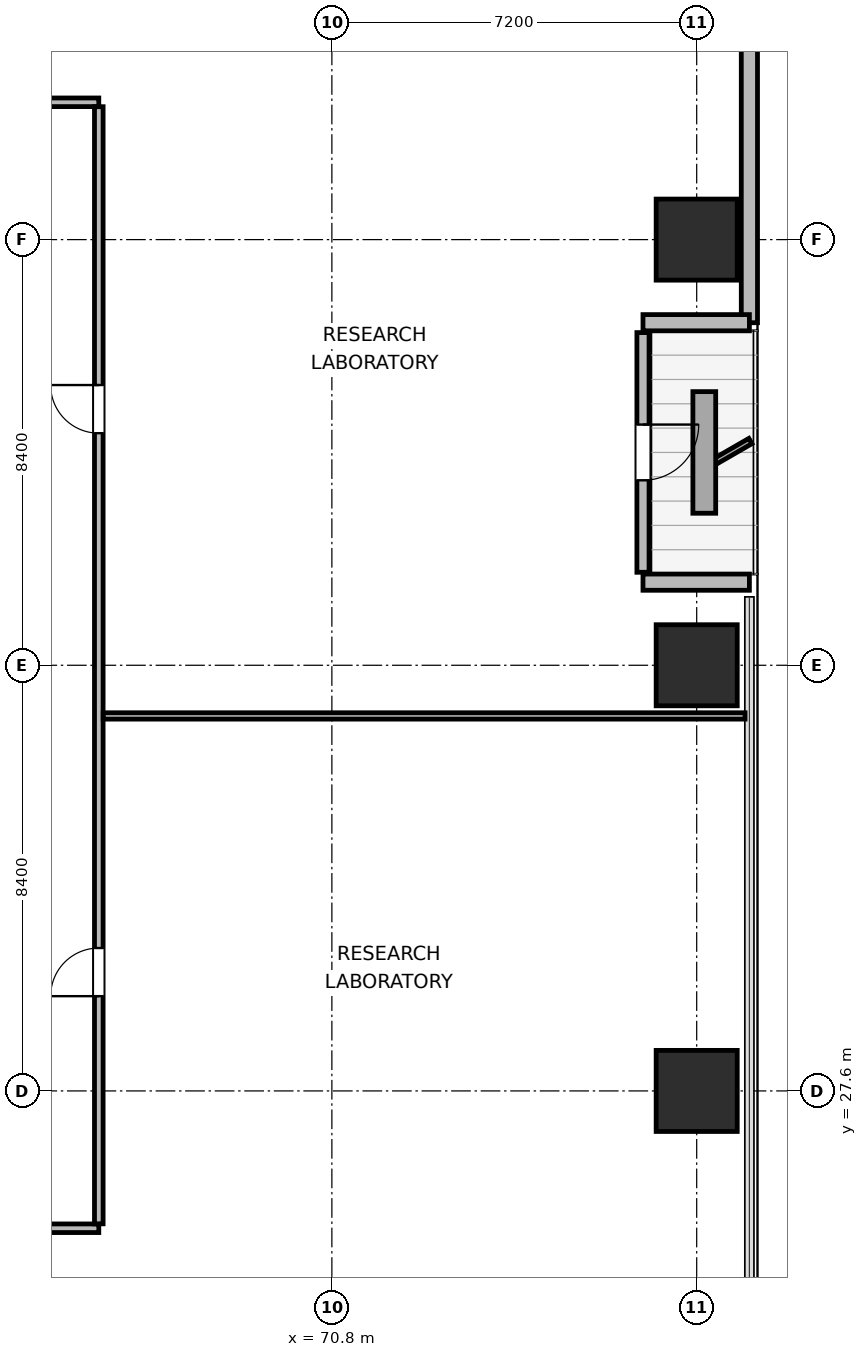
"""IFC4 building model, lengths in metres.
Left out: names, types, materials, properties, quantities, classifications, styles, units other than length and angle.
Written with IfcOpenShell. Run it as: python <this file> out.ifc"""

import sys

from ifc_helpers import new_model, si_unit, direction, frame, frame_2d, origin, origin_2d, place, context, subcontext, project, spatial, rectangle, extrude, element, fill, save


model = new_model("IFC4")
c1 = context("Model", 3, precision=1e-05, world=origin(), true_north=direction((0.0, 1.0)))
c2 = subcontext(c1, "Body", "Model", "MODEL_VIEW")
j1 = project(units=[si_unit("LENGTHUNIT", "METRE"), si_unit("PLANEANGLEUNIT", "RADIAN")], contexts=[c1])
p1 = place(None, origin())
s1 = spatial("IfcSite", under=j1, at=p1, CompositionType="ELEMENT")
p2 = place(p1, origin())
s2 = spatial("IfcBuilding", under=s1, at=p2, CompositionType="ELEMENT")
p3 = place(p2, frame((0.0, 0.0, 45.0)))
s3 = spatial("IfcBuildingStorey", under=s2, at=p3, CompositionType="ELEMENT", Elevation=45.0)
for number, where, z_axis, x_axis in (
    (1, (78.0, 27.6, 0.0), (0.0, 0.0, 1.0), (1.0, 0.0, 0.0)),
    (2, (78.0, 36.0, 0.0), (0.0, 0.0, 1.0), (1.0, 0.0, 0.0)),
    (3, (78.0, 44.4, 0.0), (0.0, 0.0, 1.0), (1.0, 0.0, 0.0)),
):
    element("IfcColumn", number, at=place(p3, frame(where, z_axis=z_axis, x_axis=x_axis)), inside=s3, PredefinedType="COLUMN", context=c2, shape_type="SweptSolid", body=[
        extrude(rectangle(XDim=1.6, YDim=1.6, at=origin_2d()), origin(), (0.0, 0.0, 1.0), 3.9),
    ])
p4 = place(p3, frame((79.04, 56.979, 0.0), z_axis=(0.0, 0.0, 1.0), x_axis=(0.0, -1.0, 0.0)))
e4 = element("IfcWall", 4, at=p4, inside=s3, PredefinedType="SOLIDWALL", context=c2, shape_type="SweptSolid", body=[
    extrude(rectangle(XDim=14.219, YDim=0.32, at=frame_2d((7.109, 0.0))), origin(), (0.0, 0.0, 1.0), 3.64),
])
p5 = place(p3, frame((79.04, 42.76, 0.0), z_axis=(0.0, 0.0, 1.0), x_axis=(-1.0, 0.0, 0.0)))
e5 = element("IfcWall", 5, at=p5, inside=s3, PredefinedType="SOLIDWALL", context=c2, shape_type="SweptSolid", body=[
    extrude(rectangle(XDim=2.1, YDim=0.32, at=frame_2d((1.05, 0.0))), origin(), (0.0, 0.0, 1.0), 2.875),
])
p6 = place(p3, frame((76.94, 42.565, 0.0), z_axis=(0.0, 0.0, 1.0), x_axis=(0.0, -1.0, 0.0)))
e6 = element("IfcWall", 6, at=p6, inside=s3, PredefinedType="SOLIDWALL", context=c2, shape_type="SweptSolid", body=[
    extrude(rectangle(XDim=4.73, YDim=0.24, at=frame_2d((2.365, 0.0))), origin(), (0.0, 0.0, 1.0), 3.162),
])
p7 = place(p6, frame((1.815, 0.0, 0.0)))
e7 = element("IfcOpeningElement", 7, at=p7, cuts=e6, PredefinedType="OPENING", context=c2, shape_type="SweptSolid", body=[
    extrude(rectangle(XDim=1.1, YDim=2.04, at=frame_2d((0.55, 1.02))), frame((0.0, 0.13, 0.0), z_axis=(0.0, -1.0, 0.0), x_axis=(1.0, 0.0, 0.0)), (0.0, 0.0, 1.0), 0.26),
])
p8 = place(p3, frame((76.94, 37.64, 0.0), z_axis=(0.0, 0.0, 1.0), x_axis=(1.0, 0.0, 0.0)))
e8 = element("IfcWall", 8, at=p8, inside=s3, PredefinedType="SOLIDWALL", context=c2, shape_type="SweptSolid", body=[
    extrude(rectangle(XDim=2.1, YDim=0.32, at=frame_2d((1.05, 0.0))), origin(), (0.0, 0.0, 1.0), 2.875),
])
p9 = place(p3, frame((29.8, 24.89, 0.0), z_axis=(0.0, 0.0, 1.0), x_axis=(1.0, 0.0, 0.0)))
e9 = element("IfcWall", 9, at=p9, inside=s3, PredefinedType="PARTITIONING", context=c2, shape_type="SweptSolid", body=[
    extrude(rectangle(XDim=36.4, YDim=0.17, at=frame_2d((18.2, 0.0))), origin(), (0.0, 0.0, 1.0), 3.64),
])
p10 = place(p9, frame((2.555, 0.0, 0.0)))
e10 = element("IfcOpeningElement", 10, at=p10, cuts=e9, PredefinedType="OPENING", context=c2, shape_type="SweptSolid", body=[
    extrude(rectangle(XDim=0.95, YDim=2.04, at=frame_2d((0.475, 1.02))), frame((0.0, 0.095, 0.0), z_axis=(0.0, -1.0, 0.0), x_axis=(1.0, 0.0, 0.0)), (0.0, 0.0, 1.0), 0.19),
])
p11 = place(p9, frame((8.01, 0.0, 0.0)))
e11 = element("IfcOpeningElement", 11, at=p11, cuts=e9, PredefinedType="OPENING", context=c2, shape_type="SweptSolid", body=[
    extrude(rectangle(XDim=0.95, YDim=2.04, at=frame_2d((0.475, 1.02))), frame((0.0, 0.095, 0.0), z_axis=(0.0, -1.0, 0.0), x_axis=(1.0, 0.0, 0.0)), (0.0, 0.0, 1.0), 0.19),
])
p12 = place(p9, frame((13.18, 0.0, 0.0)))
e12 = element("IfcOpeningElement", 12, at=p12, cuts=e9, PredefinedType="OPENING", context=c2, shape_type="SweptSolid", body=[
    extrude(rectangle(XDim=0.95, YDim=2.04, at=frame_2d((0.475, 1.02))), frame((0.0, 0.095, 0.0), z_axis=(0.0, -1.0, 0.0), x_axis=(1.0, 0.0, 0.0)), (0.0, 0.0, 1.0), 0.19),
])
p13 = place(p9, frame((18.04, 0.0, 0.0)))
e13 = element("IfcOpeningElement", 13, at=p13, cuts=e9, PredefinedType="OPENING", context=c2, shape_type="SweptSolid", body=[
    extrude(rectangle(XDim=0.95, YDim=2.04, at=frame_2d((0.475, 1.02))), frame((0.0, 0.095, 0.0), z_axis=(0.0, -1.0, 0.0), x_axis=(1.0, 0.0, 0.0)), (0.0, 0.0, 1.0), 0.19),
])
p14 = place(p9, frame((22.585, 0.0, 0.0)))
e14 = element("IfcOpeningElement", 14, at=p14, cuts=e9, PredefinedType="OPENING", context=c2, shape_type="SweptSolid", body=[
    extrude(rectangle(XDim=0.95, YDim=2.04, at=frame_2d((0.475, 1.02))), frame((0.0, 0.095, 0.0), z_axis=(0.0, -1.0, 0.0), x_axis=(1.0, 0.0, 0.0)), (0.0, 0.0, 1.0), 0.19),
])
p15 = place(p9, frame((27.44, 0.0, 0.0)))
e15 = element("IfcOpeningElement", 15, at=p15, cuts=e9, PredefinedType="OPENING", context=c2, shape_type="SweptSolid", body=[
    extrude(rectangle(XDim=0.95, YDim=2.04, at=frame_2d((0.475, 1.02))), frame((0.0, 0.095, 0.0), z_axis=(0.0, -1.0, 0.0), x_axis=(1.0, 0.0, 0.0)), (0.0, 0.0, 1.0), 0.19),
])
p16 = place(p9, frame((32.895, 0.0, 0.0)))
e16 = element("IfcOpeningElement", 16, at=p16, cuts=e9, PredefinedType="OPENING", context=c2, shape_type="SweptSolid", body=[
    extrude(rectangle(XDim=0.95, YDim=2.04, at=frame_2d((0.475, 1.02))), frame((0.0, 0.095, 0.0), z_axis=(0.0, -1.0, 0.0), x_axis=(1.0, 0.0, 0.0)), (0.0, 0.0, 1.0), 0.19),
])
p17 = place(p3, frame((29.8, 47.11, 0.0), z_axis=(0.0, 0.0, 1.0), x_axis=(1.0, 0.0, 0.0)))
e17 = element("IfcWall", 17, at=p17, inside=s3, PredefinedType="PARTITIONING", context=c2, shape_type="SweptSolid", body=[
    extrude(rectangle(XDim=36.4, YDim=0.17, at=frame_2d((18.2, 0.0))), origin(), (0.0, 0.0, 1.0), 3.64),
])
p18 = place(p17, frame((4.205, 0.0, 0.0)))
e18 = element("IfcOpeningElement", 18, at=p18, cuts=e17, PredefinedType="OPENING", context=c2, shape_type="SweptSolid", body=[
    extrude(rectangle(XDim=0.95, YDim=2.04, at=frame_2d((0.475, 1.02))), frame((0.0, 0.095, 0.0), z_axis=(0.0, -1.0, 0.0), x_axis=(1.0, 0.0, 0.0)), (0.0, 0.0, 1.0), 0.19),
])
p19 = place(p17, frame((10.385, 0.0, 0.0)))
e19 = element("IfcOpeningElement", 19, at=p19, cuts=e17, PredefinedType="OPENING", context=c2, shape_type="SweptSolid", body=[
    extrude(rectangle(XDim=0.95, YDim=2.04, at=frame_2d((0.475, 1.02))), frame((0.0, 0.095, 0.0), z_axis=(0.0, -1.0, 0.0), x_axis=(1.0, 0.0, 0.0)), (0.0, 0.0, 1.0), 0.19),
])
p20 = place(p17, frame((17.005, 0.0, 0.0)))
e20 = element("IfcOpeningElement", 20, at=p20, cuts=e17, PredefinedType="OPENING", context=c2, shape_type="SweptSolid", body=[
    extrude(rectangle(XDim=0.95, YDim=2.04, at=frame_2d((0.475, 1.02))), frame((0.0, 0.095, 0.0), z_axis=(0.0, -1.0, 0.0), x_axis=(1.0, 0.0, 0.0)), (0.0, 0.0, 1.0), 0.19),
])
p21 = place(p17, frame((24.755, 0.0, 0.0)))
e21 = element("IfcOpeningElement", 21, at=p21, cuts=e17, PredefinedType="OPENING", context=c2, shape_type="SweptSolid", body=[
    extrude(rectangle(XDim=0.95, YDim=2.04, at=frame_2d((0.475, 1.02))), frame((0.0, 0.095, 0.0), z_axis=(0.0, -1.0, 0.0), x_axis=(1.0, 0.0, 0.0)), (0.0, 0.0, 1.0), 0.19),
])
p22 = place(p17, frame((31.655, 0.0, 0.0)))
e22 = element("IfcOpeningElement", 22, at=p22, cuts=e17, PredefinedType="OPENING", context=c2, shape_type="SweptSolid", body=[
    extrude(rectangle(XDim=0.95, YDim=2.04, at=frame_2d((0.475, 1.02))), frame((0.0, 0.095, 0.0), z_axis=(0.0, -1.0, 0.0), x_axis=(1.0, 0.0, 0.0)), (0.0, 0.0, 1.0), 0.19),
])
p23 = place(p3, frame((66.2, 24.977, 0.0), z_axis=(0.0, 0.0, 1.0), x_axis=(0.0, 1.0, 0.0)))
e23 = element("IfcWall", 23, at=p23, inside=s3, PredefinedType="PARTITIONING", context=c2, shape_type="SweptSolid", body=[
    extrude(rectangle(XDim=22.046, YDim=0.17, at=frame_2d((11.023, 0.0))), origin(), (0.0, 0.0, 1.0), 3.64),
])
p24 = place(p23, frame((4.493, 0.0, 0.0)))
e24 = element("IfcOpeningElement", 24, at=p24, cuts=e23, PredefinedType="OPENING", context=c2, shape_type="SweptSolid", body=[
    extrude(rectangle(XDim=0.95, YDim=2.04, at=frame_2d((0.475, 1.02))), frame((0.0, 0.095, 0.0), z_axis=(0.0, -1.0, 0.0), x_axis=(1.0, 0.0, 0.0)), (0.0, 0.0, 1.0), 0.19),
])
p25 = place(p23, frame((15.603, 0.0, 0.0)))
e25 = element("IfcOpeningElement", 25, at=p25, cuts=e23, PredefinedType="OPENING", context=c2, shape_type="SweptSolid", body=[
    extrude(rectangle(XDim=0.95, YDim=2.04, at=frame_2d((0.475, 1.02))), frame((0.0, 0.095, 0.0), z_axis=(0.0, -1.0, 0.0), x_axis=(1.0, 0.0, 0.0)), (0.0, 0.0, 1.0), 0.19),
])
p26 = place(p3, frame((66.287, 35.0, 0.0), z_axis=(0.0, 0.0, 1.0), x_axis=(1.0, 0.0, 0.0)))
e26 = element("IfcWall", 26, at=p26, inside=s3, PredefinedType="PARTITIONING", context=c2, shape_type="SweptSolid", body=[
    extrude(rectangle(XDim=12.668, YDim=0.125, at=frame_2d((6.334, 0.0))), origin(), (0.0, 0.0, 1.0), 3.64),
])
p27 = place(p7, origin())
e27 = element("IfcDoor", 27, at=p27, inside=s3, OperationType="SINGLE_SWING_LEFT", PredefinedType="DOOR", context=c2, shape_type="SweptSolid", body=[
    extrude(rectangle(XDim=1.1, YDim=2.04, at=frame_2d((0.55, 1.02))), frame((0.0, 0.025, 0.0), z_axis=(0.0, -1.0, 0.0), x_axis=(1.0, 0.0, 0.0)), (0.0, 0.0, 1.0), 0.05),
])
fill(e7, e27)
p28 = place(p24, origin())
e28 = element("IfcDoor", 28, at=p28, inside=s3, OperationType="SINGLE_SWING_LEFT", PredefinedType="DOOR", context=c2, shape_type="SweptSolid", body=[
    extrude(rectangle(XDim=0.95, YDim=2.04, at=frame_2d((0.475, 1.02))), frame((0.0, 0.025, 0.0), z_axis=(0.0, -1.0, 0.0), x_axis=(1.0, 0.0, 0.0)), (0.0, 0.0, 1.0), 0.05),
])
fill(e24, e28)
p29 = place(p25, origin())
e29 = element("IfcDoor", 29, at=p29, inside=s3, OperationType="SINGLE_SWING_RIGHT", PredefinedType="DOOR", context=c2, shape_type="SweptSolid", body=[
    extrude(rectangle(XDim=0.95, YDim=2.04, at=frame_2d((0.475, 1.02))), frame((0.0, 0.025, 0.0), z_axis=(0.0, -1.0, 0.0), x_axis=(1.0, 0.0, 0.0)), (0.0, 0.0, 1.0), 0.05),
])
fill(e25, e29)
save(model, sys.argv[1])
